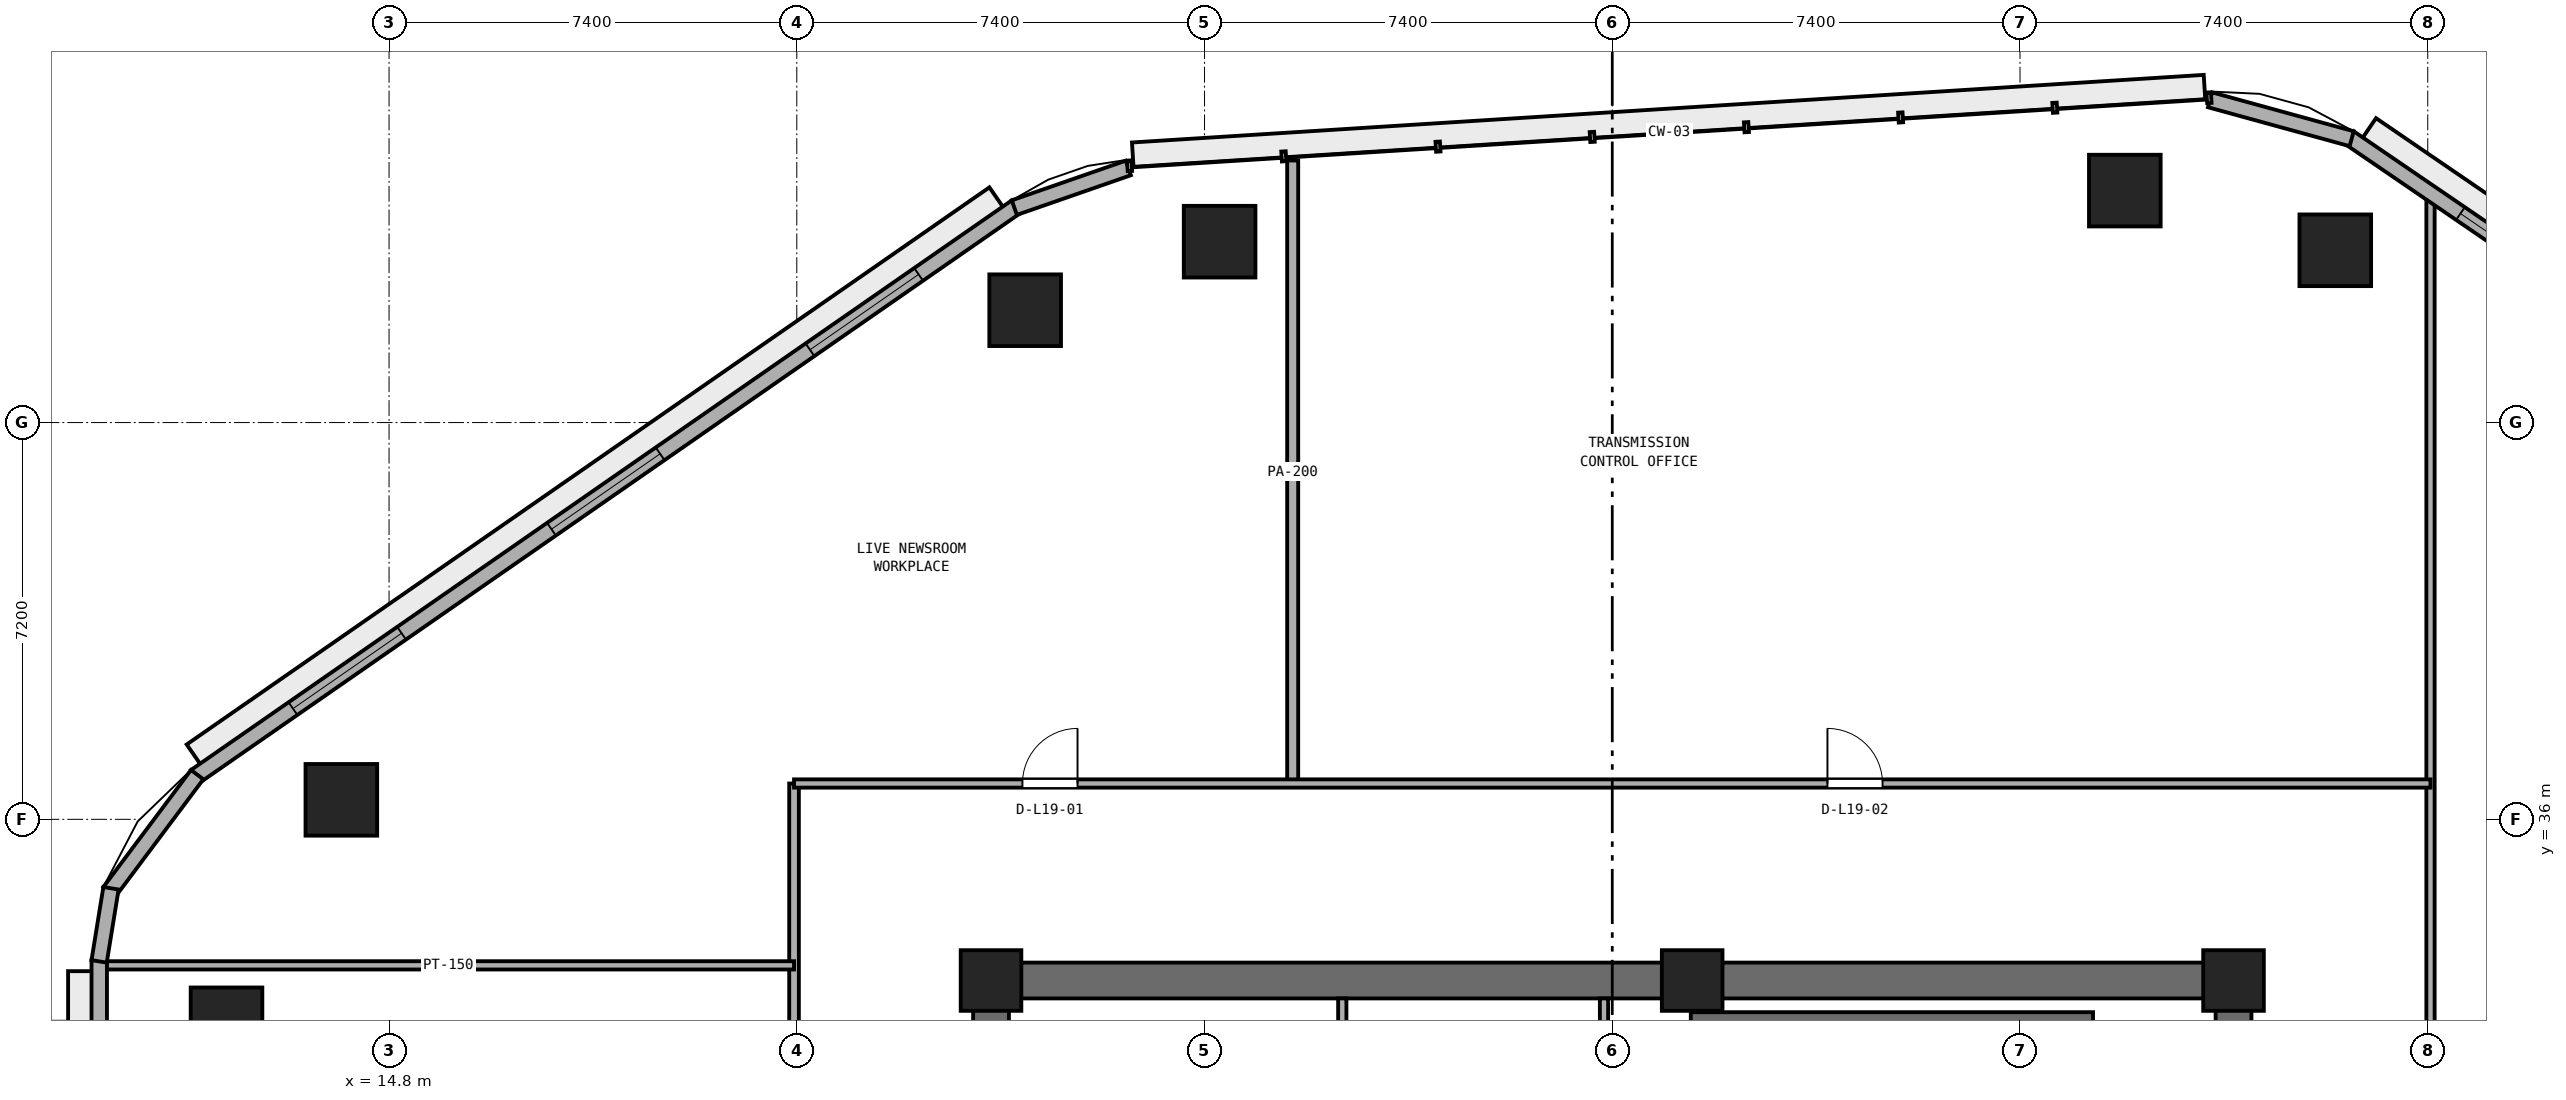
"""IFC4 building model, lengths in metres.
Left out: names, types, materials, properties, quantities, classifications, styles, units other than length and angle.
Written with IfcOpenShell. Run it as: python <this file> out.ifc"""

import sys

from ifc_helpers import new_model, si_unit, direction, frame, frame_2d, origin, origin_2d, place, context, subcontext, project, spatial, rectangle, extrude, element, fill, save


model = new_model("IFC4")
c1 = context("Model", 3, precision=1e-05, world=origin(), true_north=direction((0.0, 1.0)))
c2 = subcontext(c1, "Body", "Model", "MODEL_VIEW")
j1 = project(units=[si_unit("LENGTHUNIT", "METRE"), si_unit("PLANEANGLEUNIT", "RADIAN")], contexts=[c1])
p1 = place(None, origin())
s1 = spatial("IfcSite", under=j1, at=p1, CompositionType="ELEMENT")
p2 = place(p1, origin())
s2 = spatial("IfcBuilding", under=s1, at=p2, CompositionType="ELEMENT")
p3 = place(p2, frame((0.0, 0.0, 78.2)))
s3 = spatial("IfcBuildingStorey", under=s2, at=p3, CompositionType="ELEMENT", Elevation=78.2)
p4 = place(p3, frame((25.4, 33.075, 0.0), z_axis=(0.0, 0.0, 1.0), x_axis=(1.0, 0.0, 0.0)))
e1 = element("IfcWall", 1, at=p4, inside=s3, PredefinedType="SHEAR", context=c2, shape_type="SweptSolid", body=[
    extrude(rectangle(XDim=23.2, YDim=0.65, at=frame_2d((11.6, 0.0))), origin(), (0.0, 0.0, 1.0), 3.525),
])
p5 = place(p3, frame((25.725, 17.65, 0.0), z_axis=(0.0, 0.0, 1.0), x_axis=(0.0, 1.0, 0.0)))
e2 = element("IfcWall", 2, at=p5, inside=s3, PredefinedType="SHEAR", context=c2, shape_type="SweptSolid", body=[
    extrude(rectangle(XDim=15.1, YDim=0.65, at=frame_2d((7.55, 0.0))), origin(), (0.0, 0.0, 1.0), 3.525),
])
p6 = place(p5, frame((6.8, 0.0, 0.0)))
e3 = element("IfcOpeningElement", 3, at=p6, cuts=e2, PredefinedType="OPENING", context=c2, shape_type="SweptSolid", body=[
    extrude(rectangle(XDim=1.5, YDim=2.15, at=frame_2d((0.75, 1.075))), frame((0.0, 0.335, 0.0), z_axis=(0.0, -1.0, 0.0), x_axis=(1.0, 0.0, 0.0)), (0.0, 0.0, 1.0), 0.67),
])
p7 = place(p3, frame((48.275, 17.65, 0.0), z_axis=(0.0, 0.0, 1.0), x_axis=(0.0, 1.0, 0.0)))
e4 = element("IfcWall", 4, at=p7, inside=s3, PredefinedType="SHEAR", context=c2, shape_type="SweptSolid", body=[
    extrude(rectangle(XDim=15.1, YDim=0.65, at=frame_2d((7.55, 0.0))), origin(), (0.0, 0.0, 1.0), 3.525),
])
p8 = place(p7, frame((5.65, 0.0, 0.0)))
e5 = element("IfcOpeningElement", 5, at=p8, cuts=e4, PredefinedType="OPENING", context=c2, shape_type="SweptSolid", body=[
    extrude(rectangle(XDim=1.5, YDim=2.15, at=frame_2d((0.75, 1.075))), frame((0.0, 0.335, 0.0), z_axis=(0.0, -1.0, 0.0), x_axis=(1.0, 0.0, 0.0)), (0.0, 0.0, 1.0), 0.67),
])
for number, where, z_axis, x_axis in (
    (6, (48.275, 33.075, 0.0), (0.0, 0.0, 1.0), (1.0, 0.0, 0.0)),
    (7, (38.45, 33.075, 0.0), (0.0, 0.0, 1.0), (1.0, 0.0, 0.0)),
    (8, (25.725, 33.075, 0.0), (0.0, 0.0, 1.0), (1.0, 0.0, 0.0)),
):
    element("IfcColumn", number, at=place(p3, frame(where, z_axis=z_axis, x_axis=x_axis)), inside=s3, PredefinedType="PILASTER", context=c2, shape_type="SweptSolid", body=[
        extrude(rectangle(XDim=1.1, YDim=1.1, at=origin_2d()), origin(), (0.0, 0.0, 1.0), 3.8),
    ])
for number, where, z_axis, x_axis in (
    (9, (50.122, 46.326, 0.0), (0.0, 0.0, 1.0), (1.0, 0.0, 0.0)),
    (10, (46.302, 47.409, 0.0), (0.0, 0.0, 1.0), (1.0, 0.0, 0.0)),
    (11, (29.874, 46.482, 0.0), (0.0, 0.0, 1.0), (1.0, 0.0, 0.0)),
    (12, (26.344, 45.238, 0.0), (0.0, 0.0, 1.0), (1.0, 0.0, 0.0)),
    (13, (13.934, 36.354, 0.0), (0.0, 0.0, 1.0), (1.0, 0.0, 0.0)),
    (14, (11.85, 32.298, 0.0), (0.0, 0.0, 1.0), (1.0, 0.0, 0.0)),
):
    element("IfcColumn", number, at=place(p3, frame(where, z_axis=z_axis, x_axis=x_axis)), inside=s3, PredefinedType="COLUMN", context=c2, shape_type="SweptSolid", body=[
        extrude(rectangle(XDim=1.3, YDim=1.3, at=origin_2d()), origin(), (0.0, 0.0, 1.0), 3.8),
    ])
p9 = place(p3, frame((38.425, 32.375, 0.0), z_axis=(0.0, 0.0, 1.0), x_axis=(1.0, 0.0, 0.0)))
e15 = element("IfcWall", 15, at=p9, inside=s3, PredefinedType="SHEAR", context=c2, shape_type="SweptSolid", body=[
    extrude(rectangle(XDim=7.3, YDim=0.25, at=frame_2d((3.65, 0.0))), origin(), (0.0, 0.0, 1.0), 3.525),
])
for number, where, z_axis, x_axis in (
    (16, (32.1, 30.65, 0.0), (0.0, 0.0, 1.0), (0.0, 1.0, 0.0)),
    (17, (36.85, 30.65, 0.0), (0.0, 0.0, 1.0), (0.0, 1.0, 0.0)),
):
    element("IfcWall", number, at=place(p3, frame(where, z_axis=z_axis, x_axis=x_axis)), inside=s3, PredefinedType="PARTITIONING", context=c2, shape_type="SweptSolid", body=[
        extrude(rectangle(XDim=2.1, YDim=0.15, at=frame_2d((1.05, 0.0))), origin(), (0.0, 0.0, 1.0), 3.525),
    ])
p10 = place(p3, frame((51.85, 13.75, 0.0), z_axis=(0.0, 0.0, 1.0), x_axis=(0.0, 1.0, 0.0)))
e18 = element("IfcWall", 18, at=p10, inside=s3, PredefinedType="PARTITIONING", context=c2, shape_type="SweptSolid", body=[
    extrude(rectangle(XDim=33.644, YDim=0.15, at=frame_2d((16.822, 0.0))), origin(), (0.0, 0.0, 1.0), 3.525),
])
p11 = place(p10, frame((5.425, 0.0, 0.0)))
e19 = element("IfcOpeningElement", 19, at=p11, cuts=e18, PredefinedType="OPENING", context=c2, shape_type="SweptSolid", body=[
    extrude(rectangle(XDim=0.9, YDim=2.1, at=frame_2d((0.45, 1.05))), frame((0.0, 0.085, 0.0), z_axis=(0.0, -1.0, 0.0), x_axis=(1.0, 0.0, 0.0)), (0.0, 0.0, 1.0), 0.17),
])
p12 = place(p10, frame((15.225, 0.0, 0.0)))
e20 = element("IfcOpeningElement", 20, at=p12, cuts=e18, PredefinedType="OPENING", context=c2, shape_type="SweptSolid", body=[
    extrude(rectangle(XDim=0.9, YDim=2.1, at=frame_2d((0.45, 1.05))), frame((0.0, 0.085, 0.0), z_axis=(0.0, -1.0, 0.0), x_axis=(1.0, 0.0, 0.0)), (0.0, 0.0, 1.0), 0.17),
])
p13 = place(p3, frame((31.2, 36.65, 0.0), z_axis=(0.0, 0.0, 1.0), x_axis=(0.0, 1.0, 0.0)))
e21 = element("IfcWall", 21, at=p13, inside=s3, PredefinedType="PARTITIONING", context=c2, shape_type="SweptSolid", body=[
    extrude(rectangle(XDim=11.306, YDim=0.2, at=frame_2d((5.653, 0.0))), origin(), (0.0, 0.0, 1.0), 3.525),
])
p14 = place(p3, frame((22.15, 5.798, 0.0), z_axis=(0.0, 0.0, 1.0), x_axis=(0.0, 1.0, 0.0)))
e22 = element("IfcWall", 22, at=p14, inside=s3, PredefinedType="PARTITIONING", context=c2, shape_type="SweptSolid", body=[
    extrude(rectangle(XDim=30.852, YDim=0.175, at=frame_2d((15.426, 0.0))), origin(), (0.0, 0.0, 1.0), 3.525),
])
p15 = place(p14, frame((17.302, 0.0, 0.0)))
e23 = element("IfcOpeningElement", 23, at=p15, cuts=e22, PredefinedType="OPENING", context=c2, shape_type="SweptSolid", body=[
    extrude(rectangle(XDim=0.9, YDim=2.1, at=frame_2d((0.45, 1.05))), frame((0.0, 0.097, 0.0), z_axis=(0.0, -1.0, 0.0), x_axis=(1.0, 0.0, 0.0)), (0.0, 0.0, 1.0), 0.195),
])
p16 = place(p3, frame((9.605, 33.35, 0.0), z_axis=(0.0, 0.0, 1.0), x_axis=(1.0, 0.0, 0.0)))
e24 = element("IfcWall", 24, at=p16, inside=s3, PredefinedType="PARTITIONING", context=c2, shape_type="SweptSolid", body=[
    extrude(rectangle(XDim=12.545, YDim=0.15, at=frame_2d((6.272, 0.0))), origin(), (0.0, 0.0, 1.0), 3.525),
])
p17 = place(p3, frame((22.15, 36.65, 0.0), z_axis=(0.0, 0.0, 1.0), x_axis=(1.0, 0.0, 0.0)))
e25 = element("IfcWall", 25, at=p17, inside=s3, PredefinedType="PARTITIONING", context=c2, shape_type="SweptSolid", body=[
    extrude(rectangle(XDim=29.7, YDim=0.15, at=frame_2d((14.85, 0.0))), origin(), (0.0, 0.0, 1.0), 3.525),
])
p18 = place(p17, frame((4.145, 0.0, 0.0)))
e26 = element("IfcOpeningElement", 26, at=p18, cuts=e25, PredefinedType="OPENING", context=c2, shape_type="SweptSolid", body=[
    extrude(rectangle(XDim=1.0, YDim=2.12, at=frame_2d((0.5, 1.06))), frame((0.0, 0.085, 0.0), z_axis=(0.0, -1.0, 0.0), x_axis=(1.0, 0.0, 0.0)), (0.0, 0.0, 1.0), 0.17),
])
p19 = place(p17, frame((18.755, 0.0, 0.0)))
e27 = element("IfcOpeningElement", 27, at=p19, cuts=e25, PredefinedType="OPENING", context=c2, shape_type="SweptSolid", body=[
    extrude(rectangle(XDim=1.0, YDim=2.12, at=frame_2d((0.5, 1.06))), frame((0.0, 0.085, 0.0), z_axis=(0.0, -1.0, 0.0), x_axis=(1.0, 0.0, 0.0)), (0.0, 0.0, 1.0), 0.17),
])
p20 = place(p3, frame((64.29, 38.867, 0.0), z_axis=(0.0, 0.0, 1.0), x_axis=(-0.825755550159, 0.564028165416, 0.0)))
e28 = element("IfcWall", 28, at=p20, inside=s3, PredefinedType="STANDARD", context=c2, shape_type="SweptSolid", body=[
    extrude(rectangle(XDim=16.848, YDim=0.28, at=frame_2d((8.424, 0.0))), origin(), (0.0, 0.0, 1.0), 3.525),
])
p21 = place(p20, frame((1.941, 0.0, 0.9)))
e29 = element("IfcOpeningElement", 29, at=p21, cuts=e28, PredefinedType="OPENING", context=c2, shape_type="SweptSolid", body=[
    extrude(rectangle(XDim=2.4, YDim=1.75, at=frame_2d((1.2, 0.875))), frame((0.0, 0.15, 0.0), z_axis=(0.0, -1.0, 0.0), x_axis=(1.0, 0.0, 0.0)), (0.0, 0.0, 1.0), 0.3),
])
p22 = place(p20, frame((7.224, 0.0, 0.9)))
e30 = element("IfcOpeningElement", 30, at=p22, cuts=e28, PredefinedType="OPENING", context=c2, shape_type="SweptSolid", body=[
    extrude(rectangle(XDim=2.4, YDim=1.75, at=frame_2d((1.2, 0.875))), frame((0.0, 0.15, 0.0), z_axis=(0.0, -1.0, 0.0), x_axis=(1.0, 0.0, 0.0)), (0.0, 0.0, 1.0), 0.3),
])
p23 = place(p20, frame((12.007, 0.0, 0.9)))
e31 = element("IfcOpeningElement", 31, at=p23, cuts=e28, PredefinedType="OPENING", context=c2, shape_type="SweptSolid", body=[
    extrude(rectangle(XDim=2.4, YDim=1.75, at=frame_2d((1.2, 0.875))), frame((0.0, 0.15, 0.0), z_axis=(0.0, -1.0, 0.0), x_axis=(1.0, 0.0, 0.0)), (0.0, 0.0, 1.0), 0.3),
])
p24 = place(p3, frame((26.182, 47.118, 0.0), z_axis=(0.0, 0.0, 1.0), x_axis=(-0.821547956627, -0.570139417127, 0.0)))
e32 = element("IfcWall", 32, at=p24, inside=s3, PredefinedType="STANDARD", context=c2, shape_type="SweptSolid", body=[
    extrude(rectangle(XDim=18.132, YDim=0.28, at=frame_2d((9.066, 0.0))), origin(), (0.0, 0.0, 1.0), 3.525),
])
p25 = place(p24, frame((2.156, 0.0, 0.9)))
e33 = element("IfcOpeningElement", 33, at=p25, cuts=e32, PredefinedType="OPENING", context=c2, shape_type="SweptSolid", body=[
    extrude(rectangle(XDim=2.4, YDim=1.75, at=frame_2d((1.2, 0.875))), frame((0.0, 0.15, 0.0), z_axis=(0.0, -1.0, 0.0), x_axis=(1.0, 0.0, 0.0)), (0.0, 0.0, 1.0), 0.3),
])
p26 = place(p24, frame((7.866, 0.0, 0.9)))
e34 = element("IfcOpeningElement", 34, at=p26, cuts=e32, PredefinedType="OPENING", context=c2, shape_type="SweptSolid", body=[
    extrude(rectangle(XDim=2.4, YDim=1.75, at=frame_2d((1.2, 0.875))), frame((0.0, 0.15, 0.0), z_axis=(0.0, -1.0, 0.0), x_axis=(1.0, 0.0, 0.0)), (0.0, 0.0, 1.0), 0.3),
])
p27 = place(p24, frame((13.577, 0.0, 0.9)))
e35 = element("IfcOpeningElement", 35, at=p27, cuts=e32, PredefinedType="OPENING", context=c2, shape_type="SweptSolid", body=[
    extrude(rectangle(XDim=2.4, YDim=1.75, at=frame_2d((1.2, 0.875))), frame((0.0, 0.15, 0.0), z_axis=(0.0, -1.0, 0.0), x_axis=(1.0, 0.0, 0.0)), (0.0, 0.0, 1.0), 0.3),
])
p28 = place(p3, frame((9.54, 33.444, 0.0), z_axis=(0.0, 0.0, 1.0), x_axis=(0.0, -1.0, 0.0)))
e36 = element("IfcWall", 36, at=p28, inside=s3, PredefinedType="STANDARD", context=c2, shape_type="SweptSolid", body=[
    extrude(rectangle(XDim=17.301, YDim=0.28, at=frame_2d((8.65, 0.0))), origin(), (0.0, 0.0, 1.0), 3.525),
])
p29 = place(p28, frame((8.1, 0.0, 0.0)))
e37 = element("IfcOpeningElement", 37, at=p29, cuts=e36, PredefinedType="OPENING", context=c2, shape_type="SweptSolid", body=[
    extrude(rectangle(XDim=1.1, YDim=2.2, at=frame_2d((0.55, 1.1))), frame((0.0, 0.15, 0.0), z_axis=(0.0, -1.0, 0.0), x_axis=(1.0, 0.0, 0.0)), (0.0, 0.0, 1.0), 0.3),
])
p30 = place(p28, frame((2.017, 0.0, 0.9)))
e38 = element("IfcOpeningElement", 38, at=p30, cuts=e36, PredefinedType="OPENING", context=c2, shape_type="SweptSolid", body=[
    extrude(rectangle(XDim=2.4, YDim=1.75, at=frame_2d((1.2, 0.875))), frame((0.0, 0.15, 0.0), z_axis=(0.0, -1.0, 0.0), x_axis=(1.0, 0.0, 0.0)), (0.0, 0.0, 1.0), 0.3),
])
p31 = place(p28, frame((12.884, 0.0, 0.9)))
e39 = element("IfcOpeningElement", 39, at=p31, cuts=e36, PredefinedType="OPENING", context=c2, shape_type="SweptSolid", body=[
    extrude(rectangle(XDim=2.4, YDim=1.75, at=frame_2d((1.2, 0.875))), frame((0.0, 0.15, 0.0), z_axis=(0.0, -1.0, 0.0), x_axis=(1.0, 0.0, 0.0)), (0.0, 0.0, 1.0), 0.3),
])
p32 = place(p3, frame((50.419, 48.351, 0.0), z_axis=(0.0, 0.0, 1.0), x_axis=(-0.964263320055, 0.264945748402, 0.0)))
e40 = element("IfcWall", 40, at=p32, inside=s3, PredefinedType="STANDARD", context=c2, shape_type="SweptSolid", body=[
    extrude(rectangle(XDim=2.666, YDim=0.28, at=frame_2d((1.333, 0.0))), origin(), (0.0, 0.0, 1.0), 3.525),
])
p33 = place(p3, frame((28.217, 47.82, 0.0), z_axis=(0.0, 0.0, 1.0), x_axis=(-0.944478751803, -0.328572499447, 0.0)))
e41 = element("IfcWall", 41, at=p33, inside=s3, PredefinedType="STANDARD", context=c2, shape_type="SweptSolid", body=[
    extrude(rectangle(XDim=2.19, YDim=0.28, at=frame_2d((1.095, 0.0))), origin(), (0.0, 0.0, 1.0), 3.525),
])
p34 = place(p3, frame((11.318, 36.811, 0.0), z_axis=(0.0, 0.0, 1.0), x_axis=(-0.599455152629, -0.800408345775, 0.0)))
e42 = element("IfcWall", 42, at=p34, inside=s3, PredefinedType="STANDARD", context=c2, shape_type="SweptSolid", body=[
    extrude(rectangle(XDim=2.653, YDim=0.28, at=frame_2d((1.327, 0.0))), origin(), (0.0, 0.0, 1.0), 3.525),
])
p35 = place(p3, frame((9.753, 34.749, 0.0), z_axis=(0.0, 0.0, 1.0), x_axis=(-0.160037671962, -0.987110907423, 0.0)))
e43 = element("IfcWall", 43, at=p35, inside=s3, PredefinedType="STANDARD", context=c2, shape_type="SweptSolid", body=[
    extrude(rectangle(XDim=1.344, YDim=0.28, at=frame_2d((0.672, 0.0))), origin(), (0.0, 0.0, 1.0), 3.525),
])
p36 = place(p18, origin())
e44 = element("IfcDoor", 44, at=p36, inside=s3, OperationType="SINGLE_SWING_RIGHT", PredefinedType="DOOR", context=c2, shape_type="SweptSolid", body=[
    extrude(rectangle(XDim=1.0, YDim=2.12, at=frame_2d((0.5, 1.06))), frame((0.0, 0.025, 0.0), z_axis=(0.0, -1.0, 0.0), x_axis=(1.0, 0.0, 0.0)), (0.0, 0.0, 1.0), 0.05),
])
fill(e26, e44)
p37 = place(p19, origin())
e45 = element("IfcDoor", 45, at=p37, inside=s3, OperationType="SINGLE_SWING_LEFT", PredefinedType="DOOR", context=c2, shape_type="SweptSolid", body=[
    extrude(rectangle(XDim=1.0, YDim=2.12, at=frame_2d((0.5, 1.06))), frame((0.0, 0.025, 0.0), z_axis=(0.0, -1.0, 0.0), x_axis=(1.0, 0.0, 0.0)), (0.0, 0.0, 1.0), 0.05),
])
fill(e27, e45)
p38 = place(p23, origin())
e46 = element("IfcWindow", 46, at=p38, inside=s3, PartitioningType="SINGLE_PANEL", PredefinedType="WINDOW", context=c2, shape_type="SweptSolid", body=[
    extrude(rectangle(XDim=2.4, YDim=1.75, at=frame_2d((1.2, 0.875))), frame((0.0, 0.03, 0.0), z_axis=(0.0, -1.0, 0.0), x_axis=(1.0, 0.0, 0.0)), (0.0, 0.0, 1.0), 0.06),
])
fill(e31, e46)
p39 = place(p25, origin())
e47 = element("IfcWindow", 47, at=p39, inside=s3, PartitioningType="SINGLE_PANEL", PredefinedType="WINDOW", context=c2, shape_type="SweptSolid", body=[
    extrude(rectangle(XDim=2.4, YDim=1.75, at=frame_2d((1.2, 0.875))), frame((0.0, 0.03, 0.0), z_axis=(0.0, -1.0, 0.0), x_axis=(1.0, 0.0, 0.0)), (0.0, 0.0, 1.0), 0.06),
])
fill(e33, e47)
p40 = place(p26, origin())
e48 = element("IfcWindow", 48, at=p40, inside=s3, PartitioningType="SINGLE_PANEL", PredefinedType="WINDOW", context=c2, shape_type="SweptSolid", body=[
    extrude(rectangle(XDim=2.4, YDim=1.75, at=frame_2d((1.2, 0.875))), frame((0.0, 0.03, 0.0), z_axis=(0.0, -1.0, 0.0), x_axis=(1.0, 0.0, 0.0)), (0.0, 0.0, 1.0), 0.06),
])
fill(e34, e48)
p41 = place(p27, origin())
e49 = element("IfcWindow", 49, at=p41, inside=s3, PartitioningType="SINGLE_PANEL", PredefinedType="WINDOW", context=c2, shape_type="SweptSolid", body=[
    extrude(rectangle(XDim=2.4, YDim=1.75, at=frame_2d((1.2, 0.875))), frame((0.0, 0.03, 0.0), z_axis=(0.0, -1.0, 0.0), x_axis=(1.0, 0.0, 0.0)), (0.0, 0.0, 1.0), 0.06),
])
fill(e35, e49)
save(model, sys.argv[1])
